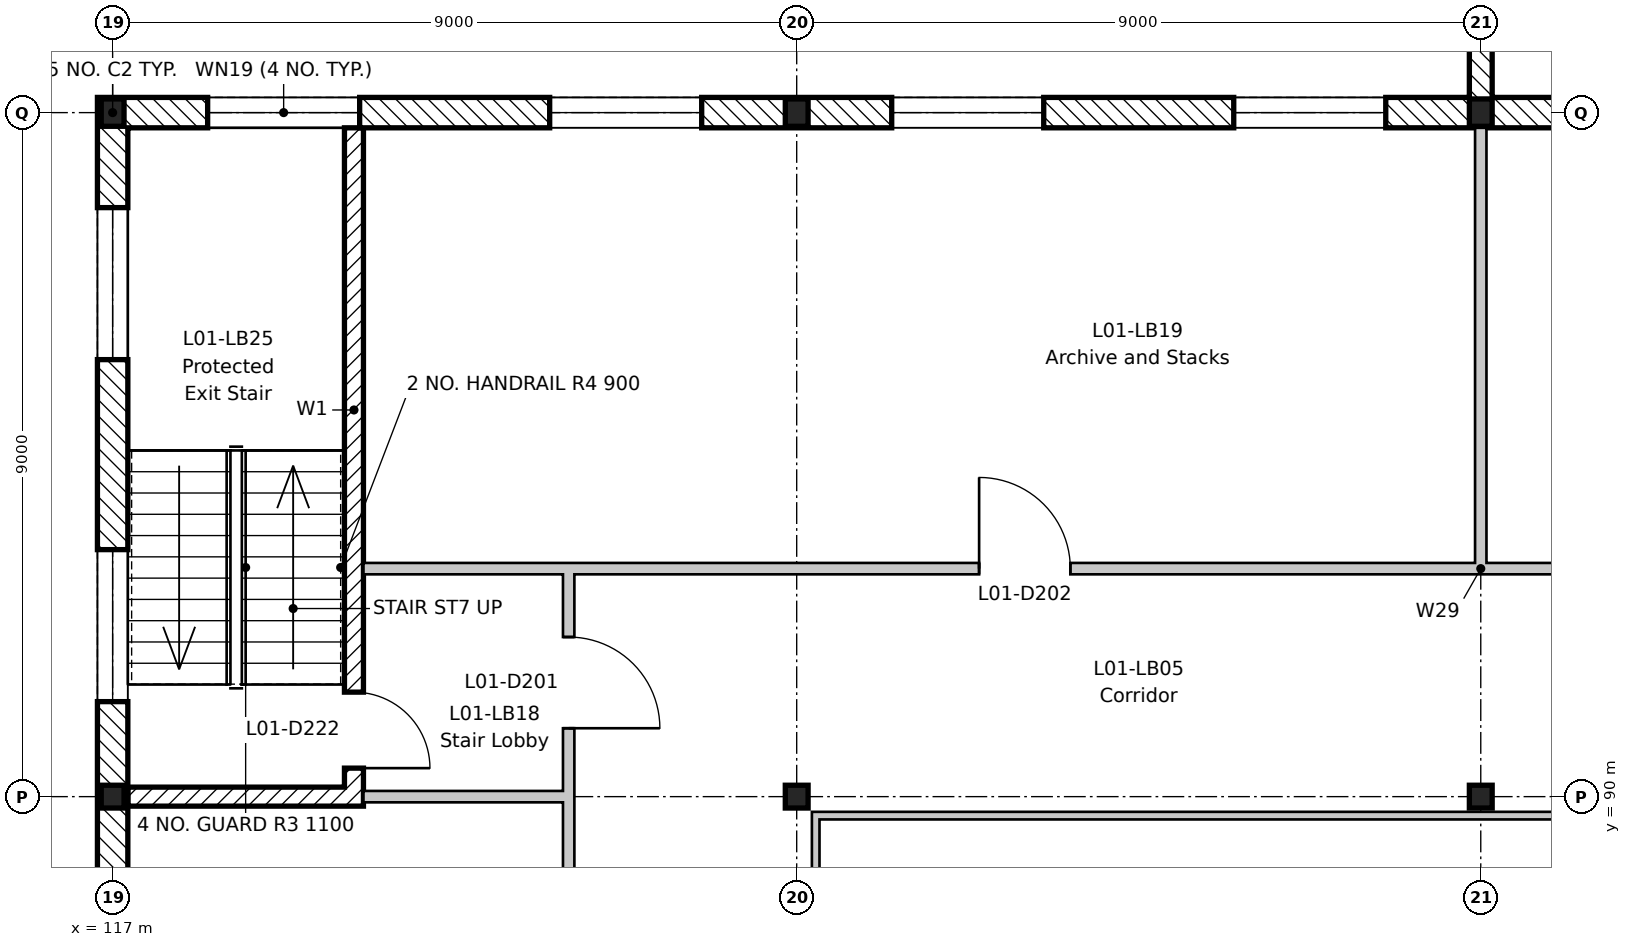
"""IFC4 building model, lengths in metres.
Left out: names, types, materials, properties, quantities, classifications, styles, units other than length and angle.
Written with IfcOpenShell. Run it as: python <this file> out.ifc"""

import sys

from ifc_helpers import new_model, si_unit, direction, frame, frame_2d, origin, origin_2d, place, context, subcontext, project, spatial, rectangle, i_section, extrude, element, fill, save


model = new_model("IFC4")
c1 = context("Model", 3, precision=1e-05, world=origin(), true_north=direction((0.0, 1.0)))
c2 = subcontext(c1, "Body", "Model", "MODEL_VIEW")
j1 = project(units=[si_unit("LENGTHUNIT", "METRE"), si_unit("PLANEANGLEUNIT", "RADIAN")], contexts=[c1])
p1 = place(None, origin())
s1 = spatial("IfcSite", under=j1, at=p1, CompositionType="ELEMENT")
p2 = place(p1, origin())
s2 = spatial("IfcBuilding", under=s1, at=p2, CompositionType="ELEMENT")
p3 = place(p2, frame((0.0, 0.0, 5.4)))
s3 = spatial("IfcBuildingStorey", under=s2, at=p3, CompositionType="ELEMENT", Elevation=5.4)
p4 = place(p3, frame((117.0, 90.0, -0.2), z_axis=(0.0, 0.0, 1.0), x_axis=(1.0, 0.0, 0.0)))
e1 = element("IfcColumn", 1, at=p4, inside=s3, PredefinedType="COLUMN", context=c2, shape_type="SweptSolid", body=[
    extrude(i_section(OverallWidth=0.3, OverallDepth=0.3, WebThickness=0.011, FlangeThickness=0.019, FilletRadius=0.027, at=origin_2d()), origin(), (0.0, 0.0, 1.0), 4.5),
])
p5 = place(p3, frame((117.0, 99.0, -0.2), z_axis=(0.0, 0.0, 1.0), x_axis=(1.0, 0.0, 0.0)))
e2 = element("IfcColumn", 2, at=p5, inside=s3, PredefinedType="COLUMN", context=c2, shape_type="SweptSolid", body=[
    extrude(i_section(OverallWidth=0.3, OverallDepth=0.36, WebThickness=0.012, FlangeThickness=0.022, FilletRadius=0.027, at=origin_2d()), origin(), (0.0, 0.0, 1.0), 4.5),
])
p6 = place(p3, frame((126.0, 90.0, -0.2), z_axis=(0.0, 0.0, 1.0), x_axis=(1.0, 0.0, 0.0)))
e3 = element("IfcColumn", 3, at=p6, inside=s3, PredefinedType="COLUMN", context=c2, shape_type="SweptSolid", body=[
    extrude(i_section(OverallWidth=0.3, OverallDepth=0.3, WebThickness=0.011, FlangeThickness=0.019, FilletRadius=0.027, at=origin_2d()), origin(), (0.0, 0.0, 1.0), 4.5),
])
p7 = place(p3, frame((126.0, 99.0, -0.2), z_axis=(0.0, 0.0, 1.0), x_axis=(1.0, 0.0, 0.0)))
e4 = element("IfcColumn", 4, at=p7, inside=s3, PredefinedType="COLUMN", context=c2, shape_type="SweptSolid", body=[
    extrude(i_section(OverallWidth=0.3, OverallDepth=0.36, WebThickness=0.012, FlangeThickness=0.022, FilletRadius=0.027, at=origin_2d()), origin(), (0.0, 0.0, 1.0), 4.5),
])
p8 = place(p3, frame((135.0, 90.0, -0.2), z_axis=(0.0, 0.0, 1.0), x_axis=(1.0, 0.0, 0.0)))
e5 = element("IfcColumn", 5, at=p8, inside=s3, PredefinedType="COLUMN", context=c2, shape_type="SweptSolid", body=[
    extrude(i_section(OverallWidth=0.3, OverallDepth=0.3, WebThickness=0.011, FlangeThickness=0.019, FilletRadius=0.027, at=origin_2d()), origin(), (0.0, 0.0, 1.0), 4.5),
])
p9 = place(p3, frame((135.0, 99.0, -0.2), z_axis=(0.0, 0.0, 1.0), x_axis=(1.0, 0.0, 0.0)))
e6 = element("IfcColumn", 6, at=p9, inside=s3, PredefinedType="COLUMN", context=c2, shape_type="SweptSolid", body=[
    extrude(i_section(OverallWidth=0.3, OverallDepth=0.36, WebThickness=0.012, FlangeThickness=0.022, FilletRadius=0.027, at=origin_2d()), origin(), (0.0, 0.0, 1.0), 4.5),
])
p10 = place(p3, frame((120.175, 90.125, 0.0), z_axis=(0.0, 0.0, 1.0), x_axis=(0.0, 1.0, 0.0)))
e7 = element("IfcWall", 7, at=p10, inside=s3, PredefinedType="SHEAR", context=c2, shape_type="SweptSolid", body=[
    extrude(rectangle(XDim=8.675, YDim=0.25, at=frame_2d((4.337, 0.0))), origin(), (0.0, 0.0, 1.0), 4.3),
])
p11 = place(p10, frame((0.25, 0.0, 0.0)))
e8 = element("IfcOpeningElement", 8, at=p11, cuts=e7, PredefinedType="OPENING", context=c2, shape_type="SweptSolid", body=[
    extrude(rectangle(XDim=1.0, YDim=2.1, at=frame_2d((0.5, 1.05))), frame((0.0, 0.135, 0.0), z_axis=(0.0, -1.0, 0.0), x_axis=(1.0, 0.0, 0.0)), (0.0, 0.0, 1.0), 0.27),
])
p12 = place(p3, frame((117.2, 90.0, 0.0), z_axis=(0.0, 0.0, 1.0), x_axis=(1.0, 0.0, 0.0)))
e9 = element("IfcWall", 9, at=p12, inside=s3, PredefinedType="SHEAR", context=c2, shape_type="SweptSolid", body=[
    extrude(rectangle(XDim=3.1, YDim=0.25, at=frame_2d((1.55, 0.0))), origin(), (0.0, 0.0, 1.0), 3.8),
])
p13 = place(p3, frame((135.0, 99.18, 0.0), z_axis=(0.0, 0.0, 1.0), x_axis=(0.0, 1.0, 0.0)))
e10 = element("IfcWall", 10, at=p13, inside=s3, PredefinedType="STANDARD", context=c2, shape_type="SweptSolid", body=[
    extrude(rectangle(XDim=2.82, YDim=0.3, at=frame_2d((1.41, 0.0))), origin(), (0.0, 0.0, 1.0), 3.97),
])
p14 = place(p3, frame((116.8, 99.0, 0.0), z_axis=(0.0, 0.0, 1.0), x_axis=(1.0, 0.0, 0.0)))
e11 = element("IfcWall", 11, at=p14, inside=s3, PredefinedType="STANDARD", context=c2, shape_type="SweptSolid", body=[
    extrude(rectangle(XDim=54.4, YDim=0.4, at=frame_2d((27.2, 0.0))), origin(), (0.0, 0.0, 1.0), 4.3),
])
p15 = place(p14, frame((1.45, 0.0, 0.5)))
e12 = element("IfcOpeningElement", 12, at=p15, cuts=e11, PredefinedType="OPENING", context=c2, shape_type="SweptSolid", body=[
    extrude(rectangle(XDim=2.0, YDim=3.2, at=frame_2d((1.0, 1.6))), frame((0.0, 0.21, 0.0), z_axis=(0.0, -1.0, 0.0), x_axis=(1.0, 0.0, 0.0)), (0.0, 0.0, 1.0), 0.42),
])
p16 = place(p14, frame((5.95, 0.0, 0.5)))
e13 = element("IfcOpeningElement", 13, at=p16, cuts=e11, PredefinedType="OPENING", context=c2, shape_type="SweptSolid", body=[
    extrude(rectangle(XDim=2.0, YDim=3.2, at=frame_2d((1.0, 1.6))), frame((0.0, 0.21, 0.0), z_axis=(0.0, -1.0, 0.0), x_axis=(1.0, 0.0, 0.0)), (0.0, 0.0, 1.0), 0.42),
])
p17 = place(p14, frame((10.45, 0.0, 0.5)))
e14 = element("IfcOpeningElement", 14, at=p17, cuts=e11, PredefinedType="OPENING", context=c2, shape_type="SweptSolid", body=[
    extrude(rectangle(XDim=2.0, YDim=3.2, at=frame_2d((1.0, 1.6))), frame((0.0, 0.21, 0.0), z_axis=(0.0, -1.0, 0.0), x_axis=(1.0, 0.0, 0.0)), (0.0, 0.0, 1.0), 0.42),
])
p18 = place(p14, frame((14.95, 0.0, 0.5)))
e15 = element("IfcOpeningElement", 15, at=p18, cuts=e11, PredefinedType="OPENING", context=c2, shape_type="SweptSolid", body=[
    extrude(rectangle(XDim=2.0, YDim=3.2, at=frame_2d((1.0, 1.6))), frame((0.0, 0.21, 0.0), z_axis=(0.0, -1.0, 0.0), x_axis=(1.0, 0.0, 0.0)), (0.0, 0.0, 1.0), 0.42),
])
p19 = place(p14, frame((28.45, 0.0, 0.5)))
e16 = element("IfcOpeningElement", 16, at=p19, cuts=e11, PredefinedType="OPENING", context=c2, shape_type="SweptSolid", body=[
    extrude(rectangle(XDim=2.0, YDim=3.2, at=frame_2d((1.0, 1.6))), frame((0.0, 0.21, 0.0), z_axis=(0.0, -1.0, 0.0), x_axis=(1.0, 0.0, 0.0)), (0.0, 0.0, 1.0), 0.42),
])
p20 = place(p14, frame((32.95, 0.0, 0.5)))
e17 = element("IfcOpeningElement", 17, at=p20, cuts=e11, PredefinedType="OPENING", context=c2, shape_type="SweptSolid", body=[
    extrude(rectangle(XDim=2.0, YDim=3.2, at=frame_2d((1.0, 1.6))), frame((0.0, 0.21, 0.0), z_axis=(0.0, -1.0, 0.0), x_axis=(1.0, 0.0, 0.0)), (0.0, 0.0, 1.0), 0.42),
])
p21 = place(p14, frame((37.45, 0.0, 0.5)))
e18 = element("IfcOpeningElement", 18, at=p21, cuts=e11, PredefinedType="OPENING", context=c2, shape_type="SweptSolid", body=[
    extrude(rectangle(XDim=2.0, YDim=3.2, at=frame_2d((1.0, 1.6))), frame((0.0, 0.21, 0.0), z_axis=(0.0, -1.0, 0.0), x_axis=(1.0, 0.0, 0.0)), (0.0, 0.0, 1.0), 0.42),
])
p22 = place(p14, frame((41.95, 0.0, 0.5)))
e19 = element("IfcOpeningElement", 19, at=p22, cuts=e11, PredefinedType="OPENING", context=c2, shape_type="SweptSolid", body=[
    extrude(rectangle(XDim=2.0, YDim=3.2, at=frame_2d((1.0, 1.6))), frame((0.0, 0.21, 0.0), z_axis=(0.0, -1.0, 0.0), x_axis=(1.0, 0.0, 0.0)), (0.0, 0.0, 1.0), 0.42),
])
p23 = place(p14, frame((19.55, 0.0, 0.0)))
e20 = element("IfcOpeningElement", 20, at=p23, cuts=e11, PredefinedType="OPENING", context=c2, shape_type="SweptSolid", body=[
    extrude(rectangle(XDim=1.8, YDim=2.4, at=frame_2d((0.9, 1.2))), frame((0.0, 0.21, 0.0), z_axis=(0.0, -1.0, 0.0), x_axis=(1.0, 0.0, 0.0)), (0.0, 0.0, 1.0), 0.42),
])
p24 = place(p14, frame((24.05, 0.0, 0.0)))
e21 = element("IfcOpeningElement", 21, at=p24, cuts=e11, PredefinedType="OPENING", context=c2, shape_type="SweptSolid", body=[
    extrude(rectangle(XDim=1.8, YDim=2.4, at=frame_2d((0.9, 1.2))), frame((0.0, 0.21, 0.0), z_axis=(0.0, -1.0, 0.0), x_axis=(1.0, 0.0, 0.0)), (0.0, 0.0, 1.0), 0.42),
])
p25 = place(p3, frame((117.0, 63.2, 0.0), z_axis=(0.0, 0.0, 1.0), x_axis=(0.0, 1.0, 0.0)))
e22 = element("IfcWall", 22, at=p25, inside=s3, PredefinedType="STANDARD", context=c2, shape_type="SweptSolid", body=[
    extrude(rectangle(XDim=35.6, YDim=0.4, at=frame_2d((17.8, 0.0))), origin(), (0.0, 0.0, 1.0), 4.3),
])
p26 = place(p25, frame((19.05, 0.0, 0.5)))
e23 = element("IfcOpeningElement", 23, at=p26, cuts=e22, PredefinedType="OPENING", context=c2, shape_type="SweptSolid", body=[
    extrude(rectangle(XDim=2.0, YDim=3.2, at=frame_2d((1.0, 1.6))), frame((0.0, 0.21, 0.0), z_axis=(0.0, -1.0, 0.0), x_axis=(1.0, 0.0, 0.0)), (0.0, 0.0, 1.0), 0.42),
])
p27 = place(p25, frame((23.55, 0.0, 0.5)))
e24 = element("IfcOpeningElement", 24, at=p27, cuts=e22, PredefinedType="OPENING", context=c2, shape_type="SweptSolid", body=[
    extrude(rectangle(XDim=2.0, YDim=3.2, at=frame_2d((1.0, 1.6))), frame((0.0, 0.21, 0.0), z_axis=(0.0, -1.0, 0.0), x_axis=(1.0, 0.0, 0.0)), (0.0, 0.0, 1.0), 0.42),
])
p28 = place(p25, frame((28.05, 0.0, 0.5)))
e25 = element("IfcOpeningElement", 25, at=p28, cuts=e22, PredefinedType="OPENING", context=c2, shape_type="SweptSolid", body=[
    extrude(rectangle(XDim=2.0, YDim=3.2, at=frame_2d((1.0, 1.6))), frame((0.0, 0.21, 0.0), z_axis=(0.0, -1.0, 0.0), x_axis=(1.0, 0.0, 0.0)), (0.0, 0.0, 1.0), 0.42),
])
p29 = place(p25, frame((32.55, 0.0, 0.5)))
e26 = element("IfcOpeningElement", 26, at=p29, cuts=e22, PredefinedType="OPENING", context=c2, shape_type="SweptSolid", body=[
    extrude(rectangle(XDim=2.0, YDim=3.2, at=frame_2d((1.0, 1.6))), frame((0.0, 0.21, 0.0), z_axis=(0.0, -1.0, 0.0), x_axis=(1.0, 0.0, 0.0)), (0.0, 0.0, 1.0), 0.42),
])
p30 = place(p25, frame((10.15, 0.0, 0.0)))
e27 = element("IfcOpeningElement", 27, at=p30, cuts=e22, PredefinedType="OPENING", context=c2, shape_type="SweptSolid", body=[
    extrude(rectangle(XDim=1.8, YDim=2.4, at=frame_2d((0.9, 1.2))), frame((0.0, 0.21, 0.0), z_axis=(0.0, -1.0, 0.0), x_axis=(1.0, 0.0, 0.0)), (0.0, 0.0, 1.0), 0.42),
])
p31 = place(p25, frame((14.65, 0.0, 0.0)))
e28 = element("IfcOpeningElement", 28, at=p31, cuts=e22, PredefinedType="OPENING", context=c2, shape_type="SweptSolid", body=[
    extrude(rectangle(XDim=1.8, YDim=2.4, at=frame_2d((0.9, 1.2))), frame((0.0, 0.21, 0.0), z_axis=(0.0, -1.0, 0.0), x_axis=(1.0, 0.0, 0.0)), (0.0, 0.0, 1.0), 0.42),
])
p32 = place(p3, frame((120.3, 90.0, 0.0), z_axis=(0.0, 0.0, 1.0), x_axis=(1.0, 0.0, 0.0)))
e29 = element("IfcWall", 29, at=p32, inside=s3, PredefinedType="PARTITIONING", context=c2, shape_type="SweptSolid", body=[
    extrude(rectangle(XDim=2.625, YDim=0.15, at=frame_2d((1.312, 0.0))), origin(), (0.0, 0.0, 1.0), 3.78),
])
p33 = place(p3, frame((120.3, 93.0, 0.0), z_axis=(0.0, 0.0, 1.0), x_axis=(1.0, 0.0, 0.0)))
e30 = element("IfcWall", 30, at=p33, inside=s3, PredefinedType="PARTITIONING", context=c2, shape_type="SweptSolid", body=[
    extrude(rectangle(XDim=26.7, YDim=0.15, at=frame_2d((13.35, 0.0))), origin(), (0.0, 0.0, 1.0), 3.78),
])
p34 = place(p33, frame((8.1, 0.0, 0.0)))
e31 = element("IfcOpeningElement", 31, at=p34, cuts=e30, PredefinedType="OPENING", context=c2, shape_type="SweptSolid", body=[
    extrude(rectangle(XDim=1.2, YDim=2.1, at=frame_2d((0.6, 1.05))), frame((0.0, 0.085, 0.0), z_axis=(0.0, -1.0, 0.0), x_axis=(1.0, 0.0, 0.0)), (0.0, 0.0, 1.0), 0.17),
])
p35 = place(p33, frame((20.1, 0.0, 0.0)))
e32 = element("IfcOpeningElement", 32, at=p35, cuts=e30, PredefinedType="OPENING", context=c2, shape_type="SweptSolid", body=[
    extrude(rectangle(XDim=1.2, YDim=2.1, at=frame_2d((0.6, 1.05))), frame((0.0, 0.085, 0.0), z_axis=(0.0, -1.0, 0.0), x_axis=(1.0, 0.0, 0.0)), (0.0, 0.0, 1.0), 0.17),
])
p36 = place(p3, frame((123.0, 72.125, 0.0), z_axis=(0.0, 0.0, 1.0), x_axis=(0.0, 1.0, 0.0)))
e33 = element("IfcWall", 33, at=p36, inside=s3, PredefinedType="PARTITIONING", context=c2, shape_type="SweptSolid", body=[
    extrude(rectangle(XDim=20.8, YDim=0.15, at=frame_2d((10.4, 0.0))), origin(), (0.0, 0.0, 1.0), 3.78),
])
p37 = place(p36, frame((3.875, 0.0, 0.0)))
e34 = element("IfcOpeningElement", 34, at=p37, cuts=e33, PredefinedType="OPENING", context=c2, shape_type="SweptSolid", body=[
    extrude(rectangle(XDim=1.0, YDim=2.1, at=frame_2d((0.5, 1.05))), frame((0.0, 0.085, 0.0), z_axis=(0.0, -1.0, 0.0), x_axis=(1.0, 0.0, 0.0)), (0.0, 0.0, 1.0), 0.17),
])
p38 = place(p36, frame((12.875, 0.0, 0.0)))
e35 = element("IfcOpeningElement", 35, at=p38, cuts=e33, PredefinedType="OPENING", context=c2, shape_type="SweptSolid", body=[
    extrude(rectangle(XDim=1.0, YDim=2.1, at=frame_2d((0.5, 1.05))), frame((0.0, 0.085, 0.0), z_axis=(0.0, -1.0, 0.0), x_axis=(1.0, 0.0, 0.0)), (0.0, 0.0, 1.0), 0.17),
])
p39 = place(p36, frame((18.775, 0.0, 0.0)))
e36 = element("IfcOpeningElement", 36, at=p39, cuts=e33, PredefinedType="OPENING", context=c2, shape_type="SweptSolid", body=[
    extrude(rectangle(XDim=1.2, YDim=2.1, at=frame_2d((0.6, 1.05))), frame((0.0, 0.085, 0.0), z_axis=(0.0, -1.0, 0.0), x_axis=(1.0, 0.0, 0.0)), (0.0, 0.0, 1.0), 0.17),
])
p40 = place(p3, frame((135.0, 93.075, 0.0), z_axis=(0.0, 0.0, 1.0), x_axis=(0.0, 1.0, 0.0)))
e37 = element("IfcWall", 37, at=p40, inside=s3, PredefinedType="PARTITIONING", context=c2, shape_type="SweptSolid", body=[
    extrude(rectangle(XDim=5.725, YDim=0.15, at=frame_2d((2.863, 0.0))), origin(), (0.0, 0.0, 1.0), 3.78),
])
p41 = place(p3, frame((126.2, 89.75, 0.0), z_axis=(0.0, 0.0, 1.0), x_axis=(1.0, 0.0, 0.0)))
e38 = element("IfcWall", 38, at=p41, inside=s3, PredefinedType="PARTITIONING", context=c2, shape_type="SweptSolid", body=[
    extrude(rectangle(XDim=35.6, YDim=0.1, at=frame_2d((17.8, 0.0))), origin(), (0.0, 0.0, 1.0), 4.3),
])
p42 = place(p41, frame((21.4, 0.0, 0.0)))
e39 = element("IfcOpeningElement", 39, at=p42, cuts=e38, PredefinedType="OPENING", context=c2, shape_type="SweptSolid", body=[
    extrude(rectangle(XDim=1.8, YDim=2.1, at=frame_2d((0.9, 1.05))), frame((0.0, 0.06, 0.0), z_axis=(0.0, -1.0, 0.0), x_axis=(1.0, 0.0, 0.0)), (0.0, 0.0, 1.0), 0.12),
])
p43 = place(p41, frame((30.4, 0.0, 0.0)))
e40 = element("IfcOpeningElement", 40, at=p43, cuts=e38, PredefinedType="OPENING", context=c2, shape_type="SweptSolid", body=[
    extrude(rectangle(XDim=1.8, YDim=2.1, at=frame_2d((0.9, 1.05))), frame((0.0, 0.06, 0.0), z_axis=(0.0, -1.0, 0.0), x_axis=(1.0, 0.0, 0.0)), (0.0, 0.0, 1.0), 0.12),
])
p44 = place(p3, frame((126.25, 72.3, 0.0), z_axis=(0.0, 0.0, 1.0), x_axis=(0.0, 1.0, 0.0)))
e41 = element("IfcWall", 41, at=p44, inside=s3, PredefinedType="PARTITIONING", context=c2, shape_type="SweptSolid", body=[
    extrude(rectangle(XDim=17.4, YDim=0.1, at=frame_2d((8.7, 0.0))), origin(), (0.0, 0.0, 1.0), 4.3),
])
p45 = place(p44, frame((3.3, 0.0, 0.0)))
e42 = element("IfcOpeningElement", 42, at=p45, cuts=e41, PredefinedType="OPENING", context=c2, shape_type="SweptSolid", body=[
    extrude(rectangle(XDim=1.8, YDim=2.1, at=frame_2d((0.9, 1.05))), frame((0.0, 0.06, 0.0), z_axis=(0.0, -1.0, 0.0), x_axis=(1.0, 0.0, 0.0)), (0.0, 0.0, 1.0), 0.12),
])
p46 = place(p15, origin())
e43 = element("IfcWindow", 43, at=p46, inside=s3, PartitioningType="SINGLE_PANEL", PredefinedType="WINDOW", context=c2, shape_type="SweptSolid", body=[
    extrude(rectangle(XDim=2.0, YDim=3.2, at=frame_2d((1.0, 1.6))), frame((0.0, 0.03, 0.0), z_axis=(0.0, -1.0, 0.0), x_axis=(1.0, 0.0, 0.0)), (0.0, 0.0, 1.0), 0.06),
])
fill(e12, e43)
p47 = place(p16, origin())
e44 = element("IfcWindow", 44, at=p47, inside=s3, PartitioningType="SINGLE_PANEL", PredefinedType="WINDOW", context=c2, shape_type="SweptSolid", body=[
    extrude(rectangle(XDim=2.0, YDim=3.2, at=frame_2d((1.0, 1.6))), frame((0.0, 0.03, 0.0), z_axis=(0.0, -1.0, 0.0), x_axis=(1.0, 0.0, 0.0)), (0.0, 0.0, 1.0), 0.06),
])
fill(e13, e44)
p48 = place(p17, origin())
e45 = element("IfcWindow", 45, at=p48, inside=s3, PartitioningType="SINGLE_PANEL", PredefinedType="WINDOW", context=c2, shape_type="SweptSolid", body=[
    extrude(rectangle(XDim=2.0, YDim=3.2, at=frame_2d((1.0, 1.6))), frame((0.0, 0.03, 0.0), z_axis=(0.0, -1.0, 0.0), x_axis=(1.0, 0.0, 0.0)), (0.0, 0.0, 1.0), 0.06),
])
fill(e14, e45)
p49 = place(p18, origin())
e46 = element("IfcWindow", 46, at=p49, inside=s3, PartitioningType="SINGLE_PANEL", PredefinedType="WINDOW", context=c2, shape_type="SweptSolid", body=[
    extrude(rectangle(XDim=2.0, YDim=3.2, at=frame_2d((1.0, 1.6))), frame((0.0, 0.03, 0.0), z_axis=(0.0, -1.0, 0.0), x_axis=(1.0, 0.0, 0.0)), (0.0, 0.0, 1.0), 0.06),
])
fill(e15, e46)
p50 = place(p28, origin())
e47 = element("IfcWindow", 47, at=p50, inside=s3, PartitioningType="SINGLE_PANEL", PredefinedType="WINDOW", context=c2, shape_type="SweptSolid", body=[
    extrude(rectangle(XDim=2.0, YDim=3.2, at=frame_2d((1.0, 1.6))), frame((0.0, 0.03, 0.0), z_axis=(0.0, -1.0, 0.0), x_axis=(1.0, 0.0, 0.0)), (0.0, 0.0, 1.0), 0.06),
])
fill(e25, e47)
p51 = place(p29, origin())
e48 = element("IfcWindow", 48, at=p51, inside=s3, PartitioningType="SINGLE_PANEL", PredefinedType="WINDOW", context=c2, shape_type="SweptSolid", body=[
    extrude(rectangle(XDim=2.0, YDim=3.2, at=frame_2d((1.0, 1.6))), frame((0.0, 0.03, 0.0), z_axis=(0.0, -1.0, 0.0), x_axis=(1.0, 0.0, 0.0)), (0.0, 0.0, 1.0), 0.06),
])
fill(e26, e48)
p52 = place(p39, frame((1.2, 0.0, 0.0), z_axis=(0.0, 0.0, 1.0), x_axis=(-1.0, 0.0, 0.0)))
e49 = element("IfcDoor", 49, at=p52, inside=s3, OperationType="SINGLE_SWING_RIGHT", PredefinedType="DOOR", context=c2, shape_type="SweptSolid", body=[
    extrude(rectangle(XDim=1.2, YDim=2.1, at=frame_2d((0.6, 1.05))), frame((0.0, 0.025, 0.0), z_axis=(0.0, -1.0, 0.0), x_axis=(1.0, 0.0, 0.0)), (0.0, 0.0, 1.0), 0.05),
])
fill(e36, e49)
p53 = place(p34, origin())
e50 = element("IfcDoor", 50, at=p53, inside=s3, OperationType="SINGLE_SWING_LEFT", PredefinedType="DOOR", context=c2, shape_type="SweptSolid", body=[
    extrude(rectangle(XDim=1.2, YDim=2.1, at=frame_2d((0.6, 1.05))), frame((0.0, 0.025, 0.0), z_axis=(0.0, -1.0, 0.0), x_axis=(1.0, 0.0, 0.0)), (0.0, 0.0, 1.0), 0.05),
])
fill(e31, e50)
p54 = place(p11, frame((1.0, 0.0, 0.0), z_axis=(0.0, 0.0, 1.0), x_axis=(-1.0, 0.0, 0.0)))
e51 = element("IfcDoor", 51, at=p54, inside=s3, OperationType="SINGLE_SWING_RIGHT", PredefinedType="DOOR", context=c2, shape_type="SweptSolid", body=[
    extrude(rectangle(XDim=1.0, YDim=2.1, at=frame_2d((0.5, 1.05))), frame((0.0, 0.025, 0.0), z_axis=(0.0, -1.0, 0.0), x_axis=(1.0, 0.0, 0.0)), (0.0, 0.0, 1.0), 0.05),
])
fill(e8, e51)
save(model, sys.argv[1])
